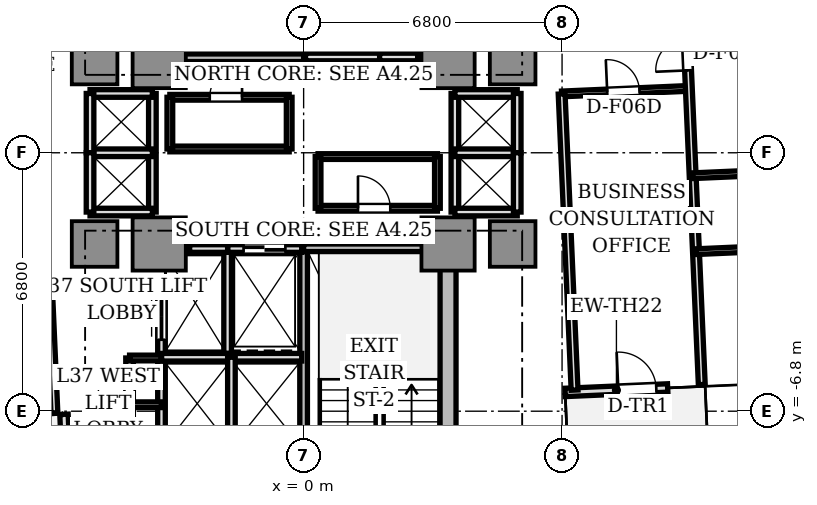
"""IFC4 building model, lengths in metres.
Left out: names, types, materials, properties, quantities, classifications, styles, units other than length and angle.
Written with IfcOpenShell. Run it as: python <this file> out.ifc"""

import sys

from ifc_helpers import new_model, si_unit, direction, frame, frame_2d, origin, origin_2d, place, context, subcontext, project, spatial, rectangle, extrude, source, transform, mapped, element, fill, save


model = new_model("IFC4")
c1 = context("Model", 3, precision=1e-05, world=origin(), true_north=direction((0.0, 1.0)))
c2 = subcontext(c1, "Body", "Model", "MODEL_VIEW")
j1 = project(units=[si_unit("LENGTHUNIT", "METRE"), si_unit("PLANEANGLEUNIT", "RADIAN")], contexts=[c1])
p1 = place(None, origin())
s1 = spatial("IfcSite", under=j1, at=p1, CompositionType="ELEMENT")
p2 = place(p1, origin())
s2 = spatial("IfcBuilding", under=s1, at=p2, CompositionType="ELEMENT")
p3 = place(p2, frame((0.0, 0.0, 134.9)))
s3 = spatial("IfcBuildingStorey", under=s2, at=p3, CompositionType="ELEMENT", Elevation=134.9)
p4 = place(p3, frame((3.8, -9.75, 0.0), z_axis=(0.0, 0.0, 1.0), x_axis=(0.0, 1.0, 0.0)))
e1 = element("IfcWall", 1, at=p4, inside=s3, PredefinedType="SHEAR", context=c2, shape_type="SweptSolid", body=[
    extrude(rectangle(XDim=6.9, YDim=0.42, at=frame_2d((3.45, 0.0))), origin(), (0.0, 0.0, 1.0), 3.03),
])
m1 = source(origin(), c2, "Body", "SweptSolid", [
    extrude(rectangle(XDim=1.4, YDim=1.4, at=origin_2d()), origin(), (0.0, 0.0, 1.0), 3.03),
])
for number, where, z_axis, x_axis in (
    (2, (-3.8, 2.4, 0.0), (0.0, 0.0, 1.0), (1.0, 0.0, 0.0)),
    (3, (3.8, 2.4, 0.0), (0.0, 0.0, 1.0), (1.0, 0.0, 0.0)),
    (4, (-3.8, -2.4, 0.0), (0.0, 0.0, 1.0), (1.0, 0.0, 0.0)),
    (5, (3.8, -2.4, 0.0), (0.0, 0.0, 1.0), (1.0, 0.0, 0.0)),
):
    element("IfcColumn", number, at=place(p3, frame(where, z_axis=z_axis, x_axis=x_axis)), inside=s3, PredefinedType="COLUMN", context=c2, shape_type="MappedRepresentation", body=[
        mapped(m1, transform((0.0, 0.0, 0.0), scale=1.0)),
    ])
m2 = source(origin(), c2, "Body", "SweptSolid", [
    extrude(rectangle(XDim=1.2, YDim=1.2, at=origin_2d()), origin(), (0.0, 0.0, 1.0), 3.03),
])
for number, where, z_axis, x_axis in (
    (6, (5.5, 2.4, 0.0), (0.0, 0.0, 1.0), (1.0, 0.0, 0.0)),
    (7, (-5.5, 2.4, 0.0), (0.0, 0.0, 1.0), (1.0, 0.0, 0.0)),
    (8, (5.5, -2.4, 0.0), (0.0, 0.0, 1.0), (1.0, 0.0, 0.0)),
    (9, (-5.5, -2.4, 0.0), (0.0, 0.0, 1.0), (1.0, 0.0, 0.0)),
):
    element("IfcColumn", number, at=place(p3, frame(where, z_axis=z_axis, x_axis=x_axis)), inside=s3, PredefinedType="COLUMN", context=c2, shape_type="MappedRepresentation", body=[
        mapped(m2, transform((0.0, 0.0, 0.0), scale=1.0)),
    ])
p5 = place(p3, frame((6.882, -6.306, 0.0), z_axis=(0.0, 0.0, 1.0), x_axis=(0.999045894436, 0.043672655174, 0.0)))
e10 = element("IfcWall", 10, at=p5, inside=s3, PredefinedType="STANDARD", context=c2, shape_type="SweptSolid", body=[
    extrude(rectangle(XDim=2.7, YDim=0.22, at=frame_2d((1.35, 0.0))), origin(), (0.0, 0.0, 1.0), 3.03),
])
p6 = place(p5, frame((1.4, 0.0, 0.0)))
e11 = element("IfcOpeningElement", 11, at=p6, cuts=e10, PredefinedType="OPENING", context=c2, shape_type="SweptSolid", body=[
    extrude(rectangle(XDim=1.0, YDim=2.2, at=frame_2d((0.5, 1.1))), frame((0.0, 0.12, 0.0), z_axis=(0.0, -1.0, 0.0), x_axis=(1.0, 0.0, 0.0)), (0.0, 0.0, 1.0), 0.24),
])
p7 = place(p3, frame((-6.306, -6.882, 0.0), z_axis=(0.0, 0.0, 1.0), x_axis=(0.043672655174, -0.999045894436, 0.0)))
e12 = element("IfcWall", 12, at=p7, inside=s3, PredefinedType="STANDARD", context=c2, shape_type="SweptSolid", body=[
    extrude(rectangle(XDim=2.7, YDim=0.22, at=frame_2d((1.35, 0.0))), origin(), (0.0, 0.0, 1.0), 3.03),
])
p8 = place(p7, frame((1.4, 0.0, 0.0)))
e13 = element("IfcOpeningElement", 13, at=p8, cuts=e12, PredefinedType="OPENING", context=c2, shape_type="SweptSolid", body=[
    extrude(rectangle(XDim=1.0, YDim=2.2, at=frame_2d((0.5, 1.1))), frame((0.0, 0.12, 0.0), z_axis=(0.0, -1.0, 0.0), x_axis=(1.0, 0.0, 0.0)), (0.0, 0.0, 1.0), 0.24),
])
p9 = place(p3, frame((0.0, 2.5, 0.0), z_axis=(0.0, 0.0, 1.0), x_axis=(0.0, 1.0, 0.0)))
e14 = element("IfcWall", 14, at=p9, inside=s3, PredefinedType="SOLIDWALL", context=c2, shape_type="SweptSolid", body=[
    extrude(rectangle(XDim=7.68, YDim=0.2, at=frame_2d((3.84, 0.0))), origin(), (0.0, 0.0, 1.0), 3.03),
])
p10 = place(p9, frame((6.36, 0.0, 0.0)))
e15 = element("IfcOpeningElement", 15, at=p10, cuts=e14, PredefinedType="OPENING", context=c2, shape_type="SweptSolid", body=[
    extrude(rectangle(XDim=1.1, YDim=2.15, at=frame_2d((0.55, 1.075))), frame((0.0, 0.11, 0.0), z_axis=(0.0, -1.0, 0.0), x_axis=(1.0, 0.0, 0.0)), (0.0, 0.0, 1.0), 0.22),
])
p11 = place(p3, frame((-3.72, 2.5, 0.0), z_axis=(0.0, 0.0, 1.0), x_axis=(1.0, 0.0, 0.0)))
e16 = element("IfcWall", 16, at=p11, inside=s3, PredefinedType="SOLIDWALL", context=c2, shape_type="SweptSolid", body=[
    extrude(rectangle(XDim=3.72, YDim=0.2, at=frame_2d((1.86, 0.0))), origin(), (0.0, 0.0, 1.0), 3.03),
])
p12 = place(p3, frame((0.0, -10.18, 0.0), z_axis=(0.0, 0.0, 1.0), x_axis=(0.0, 1.0, 0.0)))
e17 = element("IfcWall", 17, at=p12, inside=s3, PredefinedType="SOLIDWALL", context=c2, shape_type="SweptSolid", body=[
    extrude(rectangle(XDim=7.68, YDim=0.2, at=frame_2d((3.84, 0.0))), origin(), (0.0, 0.0, 1.0), 3.03),
])
p13 = place(p12, frame((0.28, 0.0, 0.0)))
e18 = element("IfcOpeningElement", 18, at=p13, cuts=e17, PredefinedType="OPENING", context=c2, shape_type="SweptSolid", body=[
    extrude(rectangle(XDim=1.1, YDim=2.15, at=frame_2d((0.55, 1.075))), frame((0.0, 0.11, 0.0), z_axis=(0.0, -1.0, 0.0), x_axis=(1.0, 0.0, 0.0)), (0.0, 0.0, 1.0), 0.22),
])
p14 = place(p3, frame((0.0, -2.5, 0.0), z_axis=(0.0, 0.0, 1.0), x_axis=(1.0, 0.0, 0.0)))
e19 = element("IfcWall", 19, at=p14, inside=s3, PredefinedType="SOLIDWALL", context=c2, shape_type="SweptSolid", body=[
    extrude(rectangle(XDim=3.72, YDim=0.2, at=frame_2d((1.86, 0.0))), origin(), (0.0, 0.0, 1.0), 3.03),
])
p15 = place(p3, frame((2.0, 2.5, 0.0), z_axis=(0.0, 0.0, 1.0), x_axis=(0.0, 1.0, 0.0)))
e20 = element("IfcWall", 20, at=p15, inside=s3, PredefinedType="SOLIDWALL", context=c2, shape_type="SweptSolid", body=[
    extrude(rectangle(XDim=2.78, YDim=0.2, at=frame_2d((1.39, 0.0))), origin(), (0.0, 0.0, 1.0), 2.58),
])
p16 = place(p3, frame((0.05, 2.52, 0.0), z_axis=(0.0, 0.0, 1.0), x_axis=(1.0, 0.0, 0.0)))
e21 = element("IfcWall", 21, at=p16, inside=s3, PredefinedType="SOLIDWALL", context=c2, shape_type="SweptSolid", body=[
    extrude(rectangle(XDim=1.95, YDim=0.2, at=frame_2d((0.975, 0.0))), origin(), (0.0, 0.0, 1.0), 2.58),
])
p17 = place(p3, frame((-2.0, -5.28, 0.0), z_axis=(0.0, 0.0, 1.0), x_axis=(0.0, 1.0, 0.0)))
e22 = element("IfcWall", 22, at=p17, inside=s3, PredefinedType="SOLIDWALL", context=c2, shape_type="SweptSolid", body=[
    extrude(rectangle(XDim=2.78, YDim=0.2, at=frame_2d((1.39, 0.0))), origin(), (0.0, 0.0, 1.0), 2.58),
])
p18 = place(p3, frame((-2.0, -2.52, 0.0), z_axis=(0.0, 0.0, 1.0), x_axis=(1.0, 0.0, 0.0)))
e23 = element("IfcWall", 23, at=p18, inside=s3, PredefinedType="SOLIDWALL", context=c2, shape_type="SweptSolid", body=[
    extrude(rectangle(XDim=1.95, YDim=0.2, at=frame_2d((0.975, 0.0))), origin(), (0.0, 0.0, 1.0), 2.58),
])
p19 = place(p18, frame((0.42, 0.0, 0.0)))
e24 = element("IfcOpeningElement", 24, at=p19, cuts=e23, PredefinedType="OPENING", context=c2, shape_type="SweptSolid", body=[
    extrude(rectangle(XDim=1.1, YDim=2.2, at=frame_2d((0.55, 1.1))), frame((0.0, 0.11, 0.0), z_axis=(0.0, -1.0, 0.0), x_axis=(1.0, 0.0, 0.0)), (0.0, 0.0, 1.0), 0.22),
])
for number, where, z_axis, x_axis in (
    (25, (2.0, 2.52, 0.0), (0.0, 0.0, 1.0), (1.0, 0.0, 0.0)),
    (26, (-3.0, -2.52, 0.0), (0.0, 0.0, 1.0), (1.0, 0.0, 0.0)),
):
    element("IfcWall", number, at=place(p3, frame(where, z_axis=z_axis, x_axis=x_axis)), inside=s3, PredefinedType="SOLIDWALL", context=c2, shape_type="SweptSolid", body=[
        extrude(rectangle(XDim=1.0, YDim=0.2, at=frame_2d((0.5, 0.0))), origin(), (0.0, 0.0, 1.0), 2.58),
    ])
p20 = place(p3, frame((-3.74, -5.36, 0.0), z_axis=(0.0, 0.0, 1.0), x_axis=(0.0, 1.0, 0.0)))
e27 = element("IfcWall", 27, at=p20, inside=s3, PredefinedType="SOLIDWALL", context=c2, shape_type="SweptSolid", body=[
    extrude(rectangle(XDim=2.08, YDim=0.2, at=frame_2d((1.04, 0.0))), origin(), (0.0, 0.0, 1.0), 2.58),
])
p21 = place(p20, frame((0.44, 0.0, 0.0)))
e28 = element("IfcOpeningElement", 28, at=p21, cuts=e27, PredefinedType="OPENING", context=c2, shape_type="SweptSolid", body=[
    extrude(rectangle(XDim=1.2, YDim=2.2, at=frame_2d((0.6, 1.1))), frame((0.0, 0.11, 0.0), z_axis=(0.0, -1.0, 0.0), x_axis=(1.0, 0.0, 0.0)), (0.0, 0.0, 1.0), 0.22),
])
p22 = place(p3, frame((-3.74, -7.86, 0.0), z_axis=(0.0, 0.0, 1.0), x_axis=(0.0, 1.0, 0.0)))
e29 = element("IfcWall", 29, at=p22, inside=s3, PredefinedType="SOLIDWALL", context=c2, shape_type="SweptSolid", body=[
    extrude(rectangle(XDim=2.48, YDim=0.2, at=frame_2d((1.24, 0.0))), origin(), (0.0, 0.0, 1.0), 2.58),
])
p23 = place(p3, frame((-3.74, -5.38, 0.0), z_axis=(0.0, 0.0, 1.0), x_axis=(1.0, 0.0, 0.0)))
e30 = element("IfcWall", 30, at=p23, inside=s3, PredefinedType="SOLIDWALL", context=c2, shape_type="SweptSolid", body=[
    extrude(rectangle(XDim=3.69, YDim=0.2, at=frame_2d((1.845, 0.0))), origin(), (0.0, 0.0, 1.0), 2.58),
])
p24 = place(p3, frame((-1.9, -7.86, 0.0), z_axis=(0.0, 0.0, 1.0), x_axis=(0.0, 1.0, 0.0)))
e31 = element("IfcWall", 31, at=p24, inside=s3, PredefinedType="SOLIDWALL", context=c2, shape_type="SweptSolid", body=[
    extrude(rectangle(XDim=2.48, YDim=0.2, at=frame_2d((1.24, 0.0))), origin(), (0.0, 0.0, 1.0), 2.58),
])
p25 = place(p3, frame((3.98, -1.56, 0.0), z_axis=(0.0, 0.0, 1.0), x_axis=(0.0, 1.0, 0.0)))
e32 = element("IfcWall", 32, at=p25, inside=s3, PredefinedType="SOLIDWALL", context=c2, shape_type="SweptSolid", body=[
    extrude(rectangle(XDim=3.12, YDim=0.2, at=frame_2d((1.56, 0.0))), origin(), (0.0, 0.0, 1.0), 2.2),
])
for number, where, z_axis, x_axis in (
    (33, (3.98, 1.56, 0.0), (0.0, 0.0, 1.0), (1.0, 0.0, 0.0)),
    (34, (3.98, -1.56, 0.0), (0.0, 0.0, 1.0), (1.0, 0.0, 0.0)),
    (35, (3.98, 0.0, 0.0), (0.0, 0.0, 1.0), (1.0, 0.0, 0.0)),
):
    element("IfcWall", number, at=place(p3, frame(where, z_axis=z_axis, x_axis=x_axis)), inside=s3, PredefinedType="SOLIDWALL", context=c2, shape_type="SweptSolid", body=[
        extrude(rectangle(XDim=1.64, YDim=0.2, at=frame_2d((0.82, 0.0))), origin(), (0.0, 0.0, 1.0), 2.58),
    ])
for number, where, z_axis, x_axis in (
    (36, (5.62, 0.0, 0.0), (0.0, 0.0, 1.0), (0.0, 1.0, 0.0)),
    (37, (5.62, -1.56, 0.0), (0.0, 0.0, 1.0), (0.0, 1.0, 0.0)),
):
    element("IfcWall", number, at=place(p3, frame(where, z_axis=z_axis, x_axis=x_axis)), inside=s3, PredefinedType="SOLIDWALL", context=c2, shape_type="SweptSolid", body=[
        extrude(rectangle(XDim=1.56, YDim=0.2, at=frame_2d((0.78, 0.0))), origin(), (0.0, 0.0, 1.0), 2.58),
    ])
p26 = place(p3, frame((-3.98, -1.56, 0.0), z_axis=(0.0, 0.0, 1.0), x_axis=(0.0, 1.0, 0.0)))
e38 = element("IfcWall", 38, at=p26, inside=s3, PredefinedType="SOLIDWALL", context=c2, shape_type="SweptSolid", body=[
    extrude(rectangle(XDim=3.12, YDim=0.2, at=frame_2d((1.56, 0.0))), origin(), (0.0, 0.0, 1.0), 2.2),
])
for number, where, z_axis, x_axis in (
    (39, (-5.62, 1.56, 0.0), (0.0, 0.0, 1.0), (1.0, 0.0, 0.0)),
    (40, (-5.62, -1.56, 0.0), (0.0, 0.0, 1.0), (1.0, 0.0, 0.0)),
    (41, (-5.62, 0.0, 0.0), (0.0, 0.0, 1.0), (1.0, 0.0, 0.0)),
):
    element("IfcWall", number, at=place(p3, frame(where, z_axis=z_axis, x_axis=x_axis)), inside=s3, PredefinedType="SOLIDWALL", context=c2, shape_type="SweptSolid", body=[
        extrude(rectangle(XDim=1.64, YDim=0.2, at=frame_2d((0.82, 0.0))), origin(), (0.0, 0.0, 1.0), 2.58),
    ])
for number, where, z_axis, x_axis in (
    (42, (-5.62, 0.0, 0.0), (0.0, 0.0, 1.0), (0.0, 1.0, 0.0)),
    (43, (-5.62, -1.56, 0.0), (0.0, 0.0, 1.0), (0.0, 1.0, 0.0)),
):
    element("IfcWall", number, at=place(p3, frame(where, z_axis=z_axis, x_axis=x_axis)), inside=s3, PredefinedType="SOLIDWALL", context=c2, shape_type="SweptSolid", body=[
        extrude(rectangle(XDim=1.56, YDim=0.2, at=frame_2d((0.78, 0.0))), origin(), (0.0, 0.0, 1.0), 2.58),
    ])
p27 = place(p3, frame((-4.58, -7.86, 0.0), z_axis=(0.0, 0.0, 1.0), x_axis=(0.0, 1.0, 0.0)))
e44 = element("IfcWall", 44, at=p27, inside=s3, PredefinedType="SOLIDWALL", context=c2, shape_type="SweptSolid", body=[
    extrude(rectangle(XDim=2.46, YDim=0.2, at=frame_2d((1.23, 0.0))), origin(), (0.0, 0.0, 1.0), 2.58),
])
p28 = place(p27, frame((0.2, 0.0, 0.0)))
e45 = element("IfcOpeningElement", 45, at=p28, cuts=e44, PredefinedType="OPENING", context=c2, shape_type="SweptSolid", body=[
    extrude(rectangle(XDim=0.85, YDim=2.1, at=frame_2d((0.425, 1.05))), frame((0.0, 0.11, 0.0), z_axis=(0.0, -1.0, 0.0), x_axis=(1.0, 0.0, 0.0)), (0.0, 0.0, 1.0), 0.22),
])
p29 = place(p27, frame((1.38, 0.0, 0.0)))
e46 = element("IfcOpeningElement", 46, at=p29, cuts=e44, PredefinedType="OPENING", context=c2, shape_type="SweptSolid", body=[
    extrude(rectangle(XDim=0.85, YDim=2.1, at=frame_2d((0.425, 1.05))), frame((0.0, 0.11, 0.0), z_axis=(0.0, -1.0, 0.0), x_axis=(1.0, 0.0, 0.0)), (0.0, 0.0, 1.0), 0.22),
])
for number, where, z_axis, x_axis in (
    (47, (-4.58, -5.4, 0.0), (0.0, 0.0, 1.0), (1.0, 0.0, 0.0)),
    (48, (-4.58, -6.63, 0.0), (0.0, 0.0, 1.0), (1.0, 0.0, 0.0)),
):
    element("IfcWall", number, at=place(p3, frame(where, z_axis=z_axis, x_axis=x_axis)), inside=s3, PredefinedType="PARTITIONING", context=c2, shape_type="SweptSolid", body=[
        extrude(rectangle(XDim=0.84, YDim=0.15, at=frame_2d((0.42, 0.0))), origin(), (0.0, 0.0, 1.0), 2.58),
    ])
p30 = place(p3, frame((-3.52, 0.1, 0.0), z_axis=(0.0, 0.0, 1.0), x_axis=(1.0, 0.0, 0.0)))
e49 = element("IfcWall", 49, at=p30, inside=s3, PredefinedType="PARTITIONING", context=c2, shape_type="SweptSolid", body=[
    extrude(rectangle(XDim=3.14, YDim=0.15, at=frame_2d((1.57, 0.0))), origin(), (0.0, 0.0, 1.0), 2.58),
])
p31 = place(p3, frame((-3.52, 1.46, 0.0), z_axis=(0.0, 0.0, 1.0), x_axis=(1.0, 0.0, 0.0)))
e50 = element("IfcWall", 50, at=p31, inside=s3, PredefinedType="PARTITIONING", context=c2, shape_type="SweptSolid", body=[
    extrude(rectangle(XDim=3.14, YDim=0.15, at=frame_2d((1.57, 0.0))), origin(), (0.0, 0.0, 1.0), 2.58),
])
p32 = place(p31, frame((1.05, 0.0, 0.0)))
e51 = element("IfcOpeningElement", 51, at=p32, cuts=e50, PredefinedType="OPENING", context=c2, shape_type="SweptSolid", body=[
    extrude(rectangle(XDim=0.85, YDim=2.1, at=frame_2d((0.425, 1.05))), frame((0.0, 0.085, 0.0), z_axis=(0.0, -1.0, 0.0), x_axis=(1.0, 0.0, 0.0)), (0.0, 0.0, 1.0), 0.17),
])
p33 = place(p3, frame((-3.52, 0.1, 0.0), z_axis=(0.0, 0.0, 1.0), x_axis=(0.0, 1.0, 0.0)))
e52 = element("IfcWall", 52, at=p33, inside=s3, PredefinedType="PARTITIONING", context=c2, shape_type="SweptSolid", body=[
    extrude(rectangle(XDim=1.36, YDim=0.15, at=frame_2d((0.68, 0.0))), origin(), (0.0, 0.0, 1.0), 2.2),
])
p34 = place(p3, frame((-0.38, 0.1, 0.0), z_axis=(0.0, 0.0, 1.0), x_axis=(0.0, 1.0, 0.0)))
e53 = element("IfcWall", 53, at=p34, inside=s3, PredefinedType="PARTITIONING", context=c2, shape_type="SweptSolid", body=[
    extrude(rectangle(XDim=1.36, YDim=0.15, at=frame_2d((0.68, 0.0))), origin(), (0.0, 0.0, 1.0), 2.58),
])
p35 = place(p3, frame((0.38, -0.1, 0.0), z_axis=(0.0, 0.0, 1.0), x_axis=(1.0, 0.0, 0.0)))
e54 = element("IfcWall", 54, at=p35, inside=s3, PredefinedType="PARTITIONING", context=c2, shape_type="SweptSolid", body=[
    extrude(rectangle(XDim=3.14, YDim=0.15, at=frame_2d((1.57, 0.0))), origin(), (0.0, 0.0, 1.0), 2.58),
])
p36 = place(p3, frame((0.38, -1.46, 0.0), z_axis=(0.0, 0.0, 1.0), x_axis=(1.0, 0.0, 0.0)))
e55 = element("IfcWall", 55, at=p36, inside=s3, PredefinedType="PARTITIONING", context=c2, shape_type="SweptSolid", body=[
    extrude(rectangle(XDim=3.14, YDim=0.15, at=frame_2d((1.57, 0.0))), origin(), (0.0, 0.0, 1.0), 2.58),
])
p37 = place(p36, frame((1.05, 0.0, 0.0)))
e56 = element("IfcOpeningElement", 56, at=p37, cuts=e55, PredefinedType="OPENING", context=c2, shape_type="SweptSolid", body=[
    extrude(rectangle(XDim=0.85, YDim=2.1, at=frame_2d((0.425, 1.05))), frame((0.0, 0.085, 0.0), z_axis=(0.0, -1.0, 0.0), x_axis=(1.0, 0.0, 0.0)), (0.0, 0.0, 1.0), 0.17),
])
p38 = place(p3, frame((0.38, -1.46, 0.0), z_axis=(0.0, 0.0, 1.0), x_axis=(0.0, 1.0, 0.0)))
e57 = element("IfcWall", 57, at=p38, inside=s3, PredefinedType="PARTITIONING", context=c2, shape_type="SweptSolid", body=[
    extrude(rectangle(XDim=1.36, YDim=0.15, at=frame_2d((0.68, 0.0))), origin(), (0.0, 0.0, 1.0), 2.58),
])
p39 = place(p3, frame((3.52, -1.46, 0.0), z_axis=(0.0, 0.0, 1.0), x_axis=(0.0, 1.0, 0.0)))
e58 = element("IfcWall", 58, at=p39, inside=s3, PredefinedType="PARTITIONING", context=c2, shape_type="SweptSolid", body=[
    extrude(rectangle(XDim=1.36, YDim=0.15, at=frame_2d((0.68, 0.0))), origin(), (0.0, 0.0, 1.0), 2.2),
])
p40 = place(p3, frame((6.789, 1.548, 0.0), z_axis=(0.0, 0.0, 1.0), x_axis=(0.99904982226, 0.043582710367, 0.0)))
e59 = element("IfcWall", 59, at=p40, inside=s3, PredefinedType="PARTITIONING", context=c2, shape_type="SweptSolid", body=[
    extrude(rectangle(XDim=3.35, YDim=0.15, at=frame_2d((1.675, 0.0))), origin(), (0.0, 0.0, 1.0), 2.58),
])
p41 = place(p40, frame((1.2, 0.0, 0.0)))
e60 = element("IfcOpeningElement", 60, at=p41, cuts=e59, PredefinedType="OPENING", context=c2, shape_type="SweptSolid", body=[
    extrude(rectangle(XDim=0.85, YDim=2.1, at=frame_2d((0.425, 1.05))), frame((0.0, 0.085, 0.0), z_axis=(0.0, -1.0, 0.0), x_axis=(1.0, 0.0, 0.0)), (0.0, 0.0, 1.0), 0.17),
])
p42 = place(p3, frame((7.129, -6.245, 0.0), z_axis=(0.0, 0.0, 1.0), x_axis=(-0.043600217373, 0.999049058378, 0.0)))
e61 = element("IfcWall", 61, at=p42, inside=s3, PredefinedType="PARTITIONING", context=c2, shape_type="SweptSolid", body=[
    extrude(rectangle(XDim=7.8, YDim=0.18, at=frame_2d((3.9, 0.0))), origin(), (0.0, 0.0, 1.0), 2.58),
])
p43 = place(p3, frame((10.476, -6.099, 0.0), z_axis=(0.0, 0.0, 1.0), x_axis=(-0.043628089563, 0.999047841598, 0.0)))
e62 = element("IfcWall", 62, at=p43, inside=s3, PredefinedType="PARTITIONING", context=c2, shape_type="SweptSolid", body=[
    extrude(rectangle(XDim=13.1, YDim=0.18, at=frame_2d((6.55, 0.0))), origin(), (0.0, 0.0, 1.0), 2.58),
])
p44 = place(p43, frame((8.275, 0.0, 0.0)))
e63 = element("IfcOpeningElement", 63, at=p44, cuts=e62, PredefinedType="OPENING", context=c2, shape_type="SweptSolid", body=[
    extrude(rectangle(XDim=0.85, YDim=2.1, at=frame_2d((0.425, 1.05))), frame((0.0, 0.1, 0.0), z_axis=(0.0, -1.0, 0.0), x_axis=(1.0, 0.0, 0.0)), (0.0, 0.0, 1.0), 0.2),
])
p45 = place(p3, frame((10.236, -0.604, 0.0), z_axis=(0.0, 0.0, 1.0), x_axis=(0.999052234136, 0.043527387554, 0.0)))
e64 = element("IfcWall", 64, at=p45, inside=s3, PredefinedType="PARTITIONING", context=c2, shape_type="SweptSolid", body=[
    extrude(rectangle(XDim=2.35, YDim=0.15, at=frame_2d((1.175, 0.0))), origin(), (0.0, 0.0, 1.0), 2.58),
])
p46 = place(p3, frame((10.323, -2.602, 0.0), z_axis=(0.0, 0.0, 1.0), x_axis=(0.999047711264, 0.043631074008, 0.0)))
e65 = element("IfcWall", 65, at=p46, inside=s3, PredefinedType="PARTITIONING", context=c2, shape_type="SweptSolid", body=[
    extrude(rectangle(XDim=2.35, YDim=0.15, at=frame_2d((1.175, 0.0))), origin(), (0.0, 0.0, 1.0), 2.55),
])
p47 = place(p3, frame((-6.71, -3.346, 0.0), z_axis=(0.0, 0.0, 1.0), x_axis=(0.043597663116, -0.999049169846, 0.0)))
e66 = element("IfcWall", 66, at=p47, inside=s3, PredefinedType="PARTITIONING", context=c2, shape_type="SweptSolid", body=[
    extrude(rectangle(XDim=3.5, YDim=0.18, at=frame_2d((1.75, 0.0))), origin(), (0.0, 0.0, 1.0), 2.58),
])
m3 = source(origin(), c2, "Body", "SweptSolid", [
    extrude(rectangle(XDim=1.0, YDim=0.05, at=origin_2d()), origin(), (0.0, 0.0, 1.0), 2.2),
])
p48 = place(p6, frame((0.5, 0.0, 0.0)))
e67 = element("IfcDoor", 67, at=p48, inside=s3, OperationType="SINGLE_SWING_LEFT", PredefinedType="DOOR", context=c2, shape_type="MappedRepresentation", body=[
    mapped(m3, transform((0.0, 0.0, 0.0), scale=1.0)),
])
fill(e11, e67)
m4 = source(origin(), c2, "Body", "SweptSolid", [
    extrude(rectangle(XDim=1.1, YDim=0.05, at=origin_2d()), origin(), (0.0, 0.0, 1.0), 2.2),
])
p49 = place(p19, frame((0.55, 0.0, 0.0)))
e68 = element("IfcDoor", 68, at=p49, inside=s3, OperationType="DOUBLE_DOOR_SLIDING", PredefinedType="DOOR", context=c2, shape_type="MappedRepresentation", body=[
    mapped(m4, transform((0.0, 0.0, 0.0), scale=1.0)),
])
fill(e24, e68)
m5 = source(origin(), c2, "Body", "SweptSolid", [
    extrude(rectangle(XDim=1.2, YDim=0.05, at=origin_2d()), origin(), (0.0, 0.0, 1.0), 2.2),
])
p50 = place(p21, frame((0.6, 0.0, 0.0)))
e69 = element("IfcDoor", 69, at=p50, inside=s3, OperationType="DOUBLE_DOOR_SLIDING", PredefinedType="DOOR", context=c2, shape_type="MappedRepresentation", body=[
    mapped(m5, transform((0.0, 0.0, 0.0), scale=1.0)),
])
fill(e28, e69)
m6 = source(origin(), c2, "Body", "SweptSolid", [
    extrude(rectangle(XDim=0.85, YDim=0.05, at=origin_2d()), origin(), (0.0, 0.0, 1.0), 2.1),
])
p51 = place(p28, frame((0.425, 0.0, 0.0)))
e70 = element("IfcDoor", 70, at=p51, inside=s3, OperationType="SINGLE_SWING_RIGHT", PredefinedType="DOOR", context=c2, shape_type="MappedRepresentation", body=[
    mapped(m6, transform((0.0, 0.0, 0.0), scale=1.0)),
])
fill(e45, e70)
p52 = place(p29, frame((0.425, 0.0, 0.0)))
e71 = element("IfcDoor", 71, at=p52, inside=s3, OperationType="SINGLE_SWING_LEFT", PredefinedType="DOOR", context=c2, shape_type="MappedRepresentation", body=[
    mapped(m6, transform((0.0, 0.0, 0.0), scale=1.0)),
])
fill(e46, e71)
p53 = place(p32, frame((0.425, 0.0, 0.0)))
e72 = element("IfcDoor", 72, at=p53, inside=s3, OperationType="SINGLE_SWING_RIGHT", PredefinedType="DOOR", context=c2, shape_type="MappedRepresentation", body=[
    mapped(m6, transform((0.0, 0.0, 0.0), scale=1.0)),
])
fill(e51, e72)
p54 = place(p37, frame((0.425, 0.0, 0.0)))
e73 = element("IfcDoor", 73, at=p54, inside=s3, OperationType="SINGLE_SWING_LEFT", PredefinedType="DOOR", context=c2, shape_type="MappedRepresentation", body=[
    mapped(m6, transform((0.0, 0.0, 0.0), scale=1.0)),
])
fill(e56, e73)
p55 = place(p41, frame((0.425, 0.0, 0.0)))
e74 = element("IfcDoor", 74, at=p55, inside=s3, OperationType="SINGLE_SWING_LEFT", PredefinedType="DOOR", context=c2, shape_type="MappedRepresentation", body=[
    mapped(m6, transform((0.0, 0.0, 0.0), scale=1.0)),
])
fill(e60, e74)
p56 = place(p44, frame((0.425, 0.0, 0.0)))
e75 = element("IfcDoor", 75, at=p56, inside=s3, OperationType="SINGLE_SWING_LEFT", PredefinedType="DOOR", context=c2, shape_type="MappedRepresentation", body=[
    mapped(m6, transform((0.0, 0.0, 0.0), scale=1.0)),
])
fill(e63, e75)
save(model, sys.argv[1])
